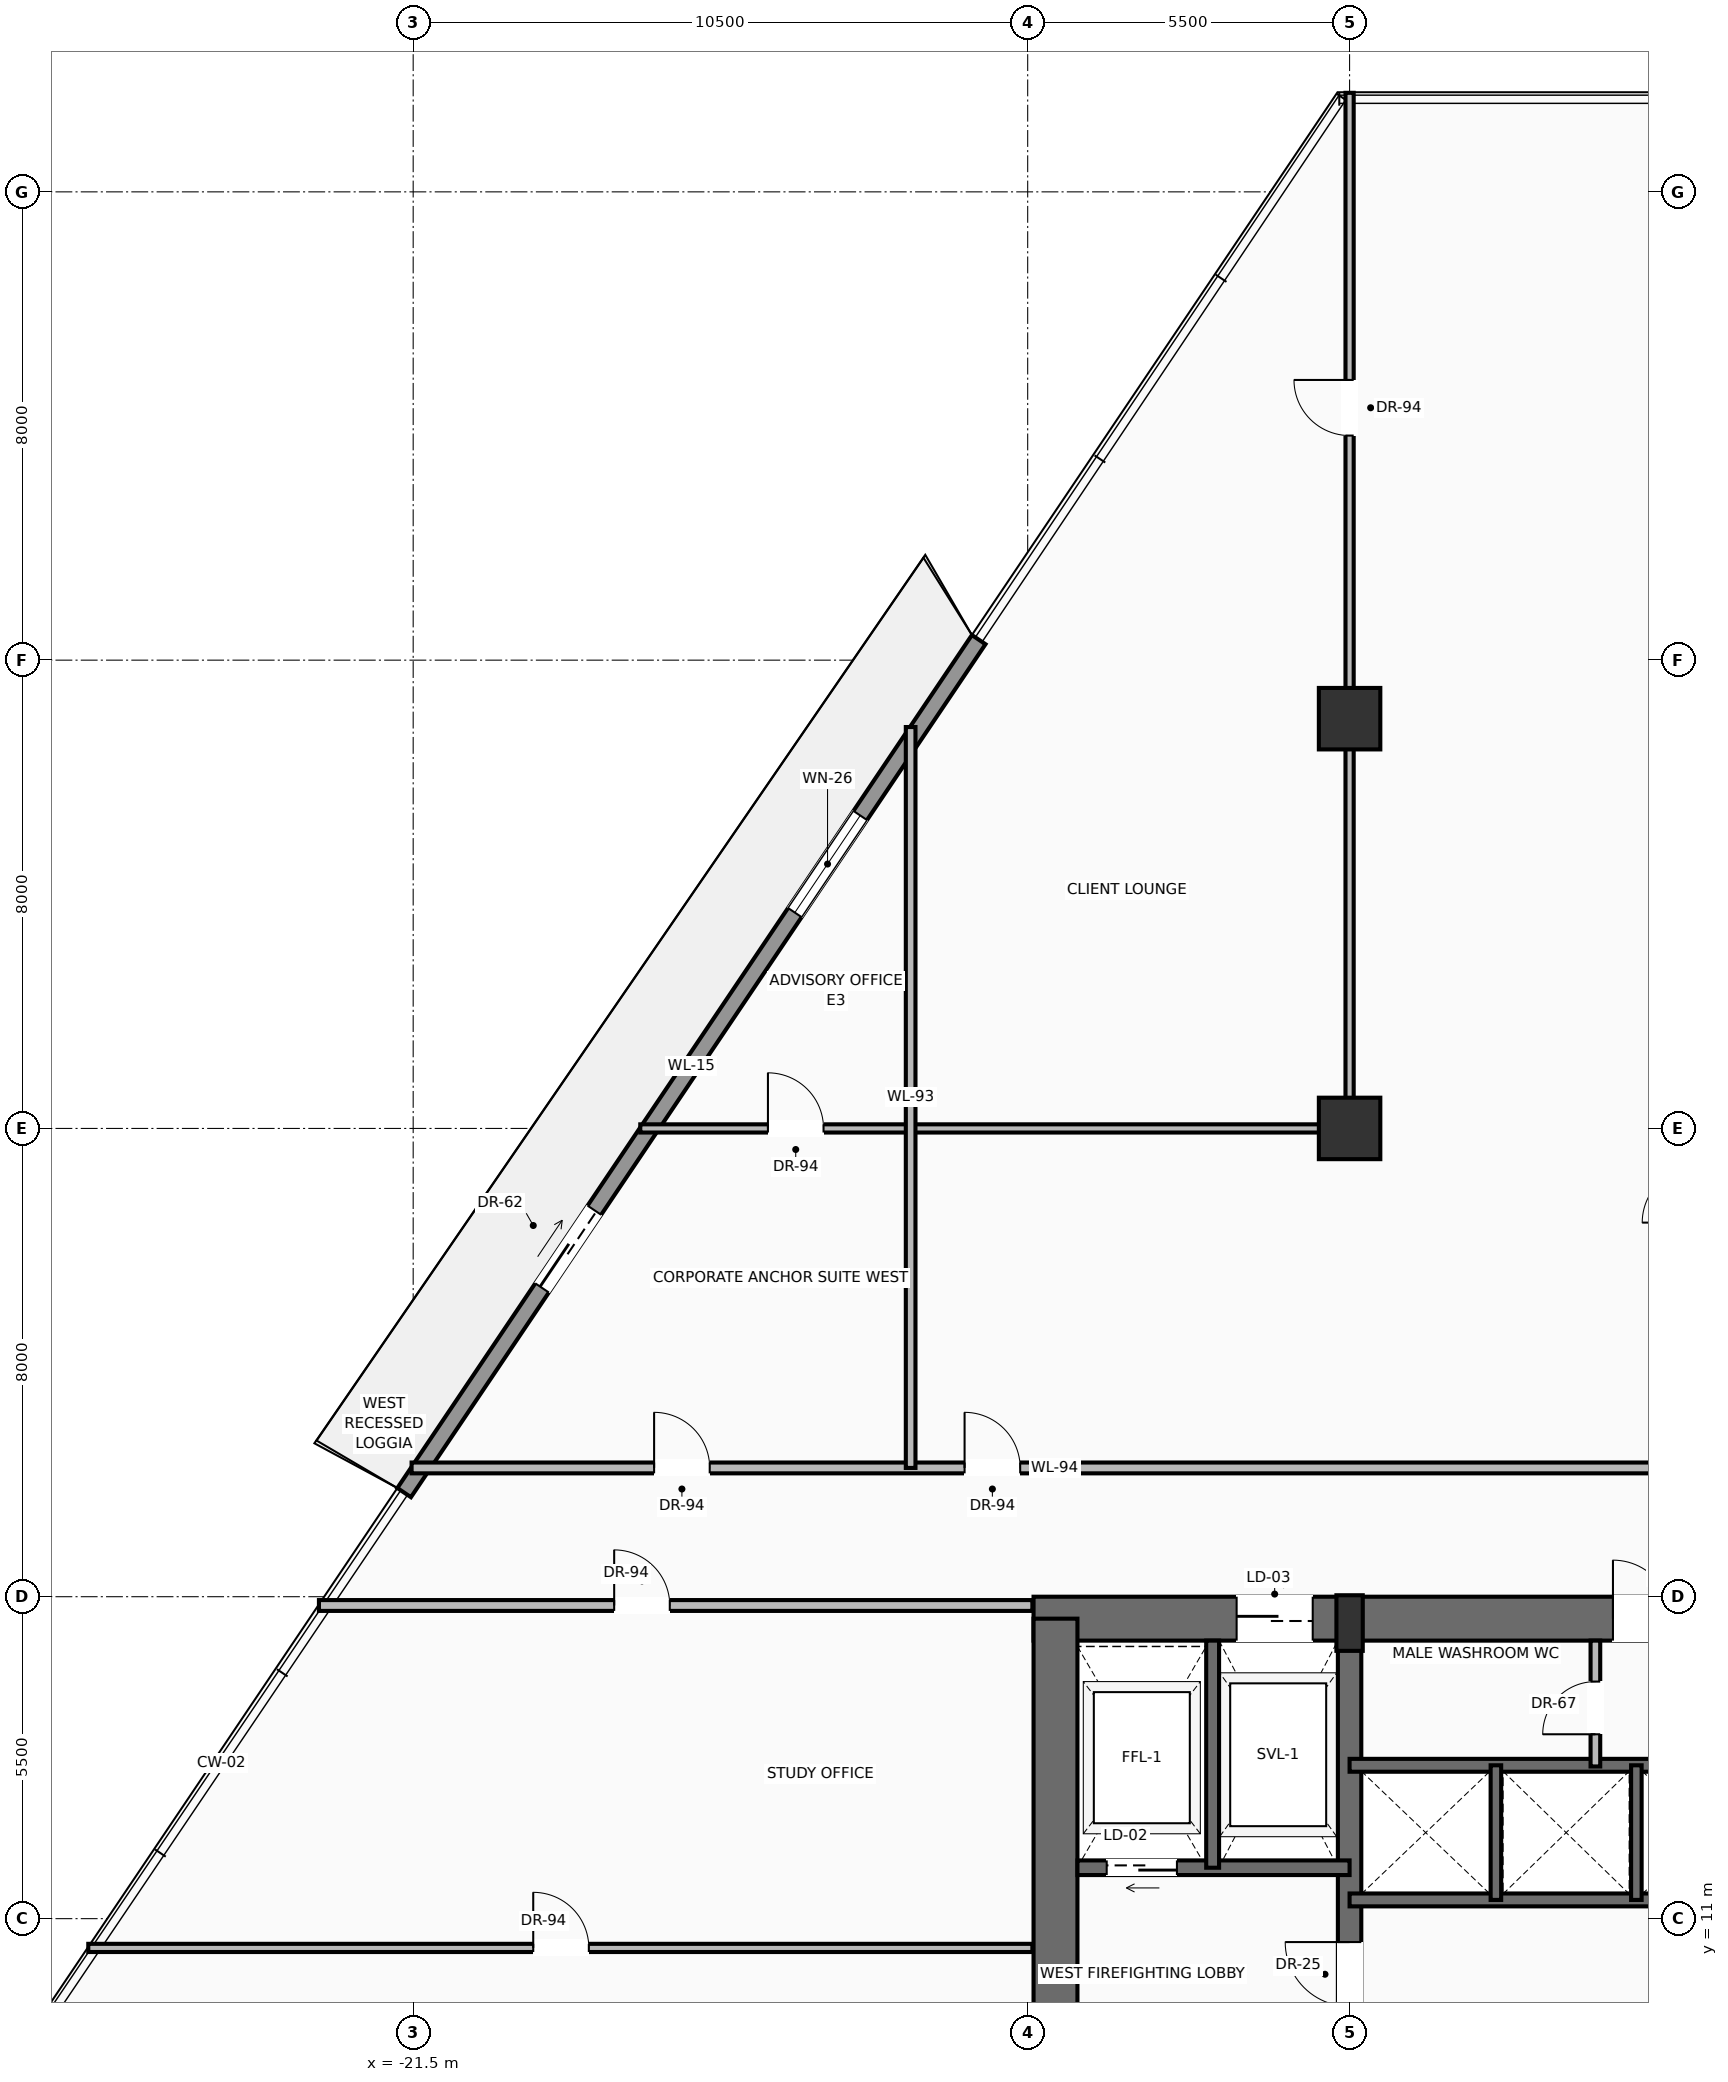
"""IFC4 building model, lengths in metres.
Left out: names, types, materials, properties, quantities, classifications, styles, units other than length and angle.
Written with IfcOpenShell. Run it as: python <this file> out.ifc"""

import sys

from ifc_helpers import new_model, si_unit, direction, frame, frame_2d, origin, origin_2d, place, context, subcontext, project, spatial, rectangle, extrude, source, transform, mapped, element, fill, save


model = new_model("IFC4")
c1 = context("Model", 3, precision=1e-05, world=origin(), true_north=direction((0.0, 1.0)))
c2 = subcontext(c1, "Body", "Model", "MODEL_VIEW")
j1 = project(units=[si_unit("LENGTHUNIT", "METRE"), si_unit("PLANEANGLEUNIT", "RADIAN")], contexts=[c1])
p1 = place(None, origin())
s1 = spatial("IfcSite", under=j1, at=p1, CompositionType="ELEMENT")
p2 = place(p1, origin())
s2 = spatial("IfcBuilding", under=s1, at=p2, CompositionType="ELEMENT")
p3 = place(p2, frame((0.0, 0.0, 91.4)))
s3 = spatial("IfcBuildingStorey", under=s2, at=p3, CompositionType="ELEMENT", Elevation=91.4)
p4 = place(p3, frame((-10.9, 16.125, 0.0), z_axis=(0.0, 0.0, 1.0), x_axis=(1.0, 0.0, 0.0)))
e1 = element("IfcWall", 1, at=p4, inside=s3, PredefinedType="SHEAR", context=c2, shape_type="SweptSolid", body=[
    extrude(rectangle(XDim=21.8, YDim=0.75, at=frame_2d((10.9, 0.0))), origin(), (0.0, 0.0, 1.0), 3.45),
])
p5 = place(p4, frame((3.47, 0.0, 0.0)))
e2 = element("IfcOpeningElement", 2, at=p5, cuts=e1, PredefinedType="OPENING", context=c2, shape_type="SweptSolid", body=[
    extrude(rectangle(XDim=1.3, YDim=2.3, at=frame_2d((0.65, 1.15))), frame((0.0, 0.385, 0.0), z_axis=(0.0, -1.0, 0.0), x_axis=(1.0, 0.0, 0.0)), (0.0, 0.0, 1.0), 0.77),
])
p6 = place(p4, frame((9.9, 0.0, 0.0)))
e3 = element("IfcOpeningElement", 3, at=p6, cuts=e1, PredefinedType="OPENING", context=c2, shape_type="SweptSolid", body=[
    extrude(rectangle(XDim=2.0, YDim=2.4, at=frame_2d((1.0, 1.2))), frame((0.0, 0.385, 0.0), z_axis=(0.0, -1.0, 0.0), x_axis=(1.0, 0.0, 0.0)), (0.0, 0.0, 1.0), 0.77),
])
p7 = place(p3, frame((-10.525, 0.475, 0.0), z_axis=(0.0, 0.0, 1.0), x_axis=(0.0, 1.0, 0.0)))
e4 = element("IfcWall", 4, at=p7, inside=s3, PredefinedType="SHEAR", context=c2, shape_type="SweptSolid", body=[
    extrude(rectangle(XDim=15.65, YDim=0.75, at=frame_2d((7.825, 0.0))), origin(), (0.0, 0.0, 1.0), 3.45),
])
p8 = place(p3, frame((-5.5, 0.475, 0.0), z_axis=(0.0, 0.0, 1.0), x_axis=(0.0, 1.0, 0.0)))
e5 = element("IfcWall", 5, at=p8, inside=s3, PredefinedType="SHEAR", context=c2, shape_type="SweptSolid", body=[
    extrude(rectangle(XDim=15.65, YDim=0.4, at=frame_2d((7.825, 0.0))), origin(), (0.0, 0.0, 1.0), 3.45),
])
p9 = place(p8, frame((9.025, 0.0, 0.0)))
e6 = element("IfcOpeningElement", 6, at=p9, cuts=e5, PredefinedType="OPENING", context=c2, shape_type="SweptSolid", body=[
    extrude(rectangle(XDim=1.1, YDim=2.2, at=frame_2d((0.55, 1.1))), frame((0.0, 0.21, 0.0), z_axis=(0.0, -1.0, 0.0), x_axis=(1.0, 0.0, 0.0)), (0.0, 0.0, 1.0), 0.42),
])
m1 = source(origin(), c2, "Body", "SweptSolid", [
    extrude(rectangle(XDim=0.45, YDim=0.95, at=origin_2d()), origin(), (0.0, 0.0, 1.0), 3.7),
])
p10 = place(p3, frame((-5.5, 16.05, 0.0), z_axis=(0.0, 0.0, 1.0), x_axis=(1.0, 0.0, 0.0)))
e7 = element("IfcColumn", 7, at=p10, inside=s3, PredefinedType="PILASTER", context=c2, shape_type="MappedRepresentation", body=[
    mapped(m1, transform((0.0, 0.0, 0.0), scale=1.0)),
])
m2 = source(origin(), c2, "Body", "SweptSolid", [
    extrude(rectangle(XDim=1.05, YDim=1.05, at=origin_2d()), origin(), (0.0, 0.0, 1.0), 3.7),
])
for number, where, z_axis, x_axis in (
    (8, (-5.5, 24.5, 0.0), (0.0, 0.0, 1.0), (1.0, 0.0, 0.0)),
    (9, (-5.5, 31.5, 0.0), (0.0, 0.0, 1.0), (1.0, 0.0, 0.0)),
):
    element("IfcColumn", number, at=place(p3, frame(where, z_axis=z_axis, x_axis=x_axis)), inside=s3, PredefinedType="COLUMN", context=c2, shape_type="MappedRepresentation", body=[
        mapped(m2, transform((0.0, 0.0, 0.0), scale=1.0)),
    ])
p11 = place(p3, frame((-21.654, 18.279, 0.0), z_axis=(0.0, 0.0, 1.0), x_axis=(0.558730690693, 0.829349151611, 0.0)))
e10 = element("IfcWall", 10, at=p11, inside=s3, PredefinedType="SOLIDWALL", context=c2, shape_type="SweptSolid", body=[
    extrude(rectangle(XDim=17.57, YDim=0.28, at=frame_2d((8.785, 0.0))), origin(), (0.0, 0.0, 1.0), 3.03),
])
p12 = place(p11, frame((4.217, 0.0, 0.0)))
e11 = element("IfcOpeningElement", 11, at=p12, cuts=e10, PredefinedType="OPENING", context=c2, shape_type="SweptSolid", body=[
    extrude(rectangle(XDim=1.6, YDim=2.35, at=frame_2d((0.8, 1.175))), frame((0.0, 0.15, 0.0), z_axis=(0.0, -1.0, 0.0), x_axis=(1.0, 0.0, 0.0)), (0.0, 0.0, 1.0), 0.3),
])
p13 = place(p11, frame((11.948, 0.0, 0.9)))
e12 = element("IfcOpeningElement", 12, at=p13, cuts=e10, PredefinedType="OPENING", context=c2, shape_type="SweptSolid", body=[
    extrude(rectangle(XDim=2.0, YDim=1.85, at=frame_2d((1.0, 0.925))), frame((0.0, 0.15, 0.0), z_axis=(0.0, -1.0, 0.0), x_axis=(1.0, 0.0, 0.0)), (0.0, 0.0, 1.0), 0.3),
])
p14 = place(p3, frame((-5.5, 11.87, 0.0), z_axis=(0.0, 0.0, 1.0), x_axis=(-1.0, 0.0, 0.0)))
e13 = element("IfcWall", 13, at=p14, inside=s3, PredefinedType="SOLIDWALL", context=c2, shape_type="SweptSolid", body=[
    extrude(rectangle(XDim=4.65, YDim=0.25, at=frame_2d((2.325, 0.0))), origin(), (0.0, 0.0, 1.0), 3.45),
])
p15 = place(p14, frame((2.95, 0.0, 0.0)))
e14 = element("IfcOpeningElement", 14, at=p15, cuts=e13, PredefinedType="OPENING", context=c2, shape_type="SweptSolid", body=[
    extrude(rectangle(XDim=1.2, YDim=2.25, at=frame_2d((0.6, 1.125))), frame((0.0, 0.135, 0.0), z_axis=(0.0, -1.0, 0.0), x_axis=(1.0, 0.0, 0.0)), (0.0, 0.0, 1.0), 0.27),
])
p16 = place(p3, frame((-7.84, 11.87, 0.0), z_axis=(0.0, 0.0, 1.0), x_axis=(0.0, 1.0, 0.0)))
e15 = element("IfcWall", 15, at=p16, inside=s3, PredefinedType="SOLIDWALL", context=c2, shape_type="SweptSolid", body=[
    extrude(rectangle(XDim=3.88, YDim=0.22, at=frame_2d((1.94, 0.0))), origin(), (0.0, 0.0, 1.0), 3.45),
])
for number, where, z_axis, x_axis in (
    (16, (-5.5, 11.32, 0.0), (0.0, 0.0, 1.0), (1.0, 0.0, 0.0)),
    (17, (-5.5, 13.62, 0.0), (0.0, 0.0, 1.0), (1.0, 0.0, 0.0)),
):
    element("IfcWall", number, at=place(p3, frame(where, z_axis=z_axis, x_axis=x_axis)), inside=s3, PredefinedType="SOLIDWALL", context=c2, shape_type="SweptSolid", body=[
        extrude(rectangle(XDim=7.32, YDim=0.22, at=frame_2d((3.66, 0.0))), origin(), (0.0, 0.0, 1.0), 3.45),
    ])
for number, where, z_axis, x_axis in (
    (18, (-3.0, 11.32, 0.0), (0.0, 0.0, 1.0), (0.0, 1.0, 0.0)),
    (19, (-0.6, 11.32, 0.0), (0.0, 0.0, 1.0), (0.0, 1.0, 0.0)),
):
    element("IfcWall", number, at=place(p3, frame(where, z_axis=z_axis, x_axis=x_axis)), inside=s3, PredefinedType="SOLIDWALL", context=c2, shape_type="SweptSolid", body=[
        extrude(rectangle(XDim=2.3, YDim=0.18, at=frame_2d((1.15, 0.0))), origin(), (0.0, 0.0, 1.0), 3.45),
    ])
p17 = place(p3, frame((-1.3, 13.6, 0.0), z_axis=(0.0, 0.0, 1.0), x_axis=(0.0, 1.0, 0.0)))
e20 = element("IfcWall", 20, at=p17, inside=s3, PredefinedType="PARTITIONING", context=c2, shape_type="SweptSolid", body=[
    extrude(rectangle(XDim=2.15, YDim=0.165, at=frame_2d((1.075, 0.0))), origin(), (0.0, 0.0, 1.0), 3.442),
])
p18 = place(p17, frame((0.55, 0.0, 0.0)))
e21 = element("IfcOpeningElement", 21, at=p18, cuts=e20, PredefinedType="OPENING", context=c2, shape_type="SweptSolid", body=[
    extrude(rectangle(XDim=0.9, YDim=2.1, at=frame_2d((0.45, 1.05))), frame((0.0, 0.093, 0.0), z_axis=(0.0, -1.0, 0.0), x_axis=(1.0, 0.0, 0.0)), (0.0, 0.0, 1.0), 0.185),
])
p19 = place(p3, frame((-23.11, 16.35, 0.0), z_axis=(0.0, 0.0, 1.0), x_axis=(1.0, 0.0, 0.0)))
e22 = element("IfcWall", 22, at=p19, inside=s3, PredefinedType="PARTITIONING", context=c2, shape_type="SweptSolid", body=[
    extrude(rectangle(XDim=12.19, YDim=0.185, at=frame_2d((6.095, 0.0))), origin(), (0.0, 0.0, 1.0), 2.747),
])
p20 = place(p19, frame((5.045, 0.0, 0.0)))
e23 = element("IfcOpeningElement", 23, at=p20, cuts=e22, PredefinedType="OPENING", context=c2, shape_type="SweptSolid", body=[
    extrude(rectangle(XDim=0.95, YDim=2.2, at=frame_2d((0.475, 1.1))), frame((0.0, 0.103, 0.0), z_axis=(0.0, -1.0, 0.0), x_axis=(1.0, 0.0, 0.0)), (0.0, 0.0, 1.0), 0.205),
])
p21 = place(p3, frame((-21.527, 18.7, 0.0), z_axis=(0.0, 0.0, 1.0), x_axis=(1.0, 0.0, 0.0)))
e24 = element("IfcWall", 24, at=p21, inside=s3, PredefinedType="PARTITIONING", context=c2, shape_type="SweptSolid", body=[
    extrude(rectangle(XDim=21.977, YDim=0.185, at=frame_2d((10.989, 0.0))), origin(), (0.0, 0.0, 1.0), 2.747),
])
p22 = place(p21, frame((9.449, 0.0, 0.0)))
e25 = element("IfcOpeningElement", 25, at=p22, cuts=e24, PredefinedType="OPENING", context=c2, shape_type="SweptSolid", body=[
    extrude(rectangle(XDim=0.95, YDim=2.2, at=frame_2d((0.475, 1.1))), frame((0.0, 0.103, 0.0), z_axis=(0.0, -1.0, 0.0), x_axis=(1.0, 0.0, 0.0)), (0.0, 0.0, 1.0), 0.205),
])
p23 = place(p21, frame((4.144, 0.0, 0.0)))
e26 = element("IfcOpeningElement", 26, at=p23, cuts=e24, PredefinedType="OPENING", context=c2, shape_type="SweptSolid", body=[
    extrude(rectangle(XDim=0.95, YDim=2.2, at=frame_2d((0.475, 1.1))), frame((0.0, 0.103, 0.0), z_axis=(0.0, -1.0, 0.0), x_axis=(1.0, 0.0, 0.0)), (0.0, 0.0, 1.0), 0.205),
])
p24 = place(p3, frame((-5.5, 24.5, 0.0), z_axis=(0.0, 0.0, 1.0), x_axis=(0.0, 1.0, 0.0)))
e27 = element("IfcWall", 27, at=p24, inside=s3, PredefinedType="PARTITIONING", context=c2, shape_type="SweptSolid", body=[
    extrude(rectangle(XDim=17.692, YDim=0.14, at=frame_2d((8.846, 0.0))), origin(), (0.0, 0.0, 1.0), 2.747),
])
p25 = place(p24, frame((11.837, 0.0, 0.0)))
e28 = element("IfcOpeningElement", 28, at=p25, cuts=e27, PredefinedType="OPENING", context=c2, shape_type="SweptSolid", body=[
    extrude(rectangle(XDim=0.95, YDim=2.2, at=frame_2d((0.475, 1.1))), frame((0.0, 0.08, 0.0), z_axis=(0.0, -1.0, 0.0), x_axis=(1.0, 0.0, 0.0)), (0.0, 0.0, 1.0), 0.16),
])
p26 = place(p3, frame((-17.62, 24.5, 0.0), z_axis=(0.0, 0.0, 1.0), x_axis=(1.0, 0.0, 0.0)))
e29 = element("IfcWall", 29, at=p26, inside=s3, PredefinedType="PARTITIONING", context=c2, shape_type="SweptSolid", body=[
    extrude(rectangle(XDim=12.12, YDim=0.14, at=frame_2d((6.06, 0.0))), origin(), (0.0, 0.0, 1.0), 2.747),
])
p27 = place(p26, frame((2.181, 0.0, 0.0)))
e30 = element("IfcOpeningElement", 30, at=p27, cuts=e29, PredefinedType="OPENING", context=c2, shape_type="SweptSolid", body=[
    extrude(rectangle(XDim=0.95, YDim=2.2, at=frame_2d((0.475, 1.1))), frame((0.0, 0.08, 0.0), z_axis=(0.0, -1.0, 0.0), x_axis=(1.0, 0.0, 0.0)), (0.0, 0.0, 1.0), 0.16),
])
p28 = place(p3, frame((-13.0, 18.7, 0.0), z_axis=(0.0, 0.0, 1.0), x_axis=(0.0, 1.0, 0.0)))
e31 = element("IfcWall", 31, at=p28, inside=s3, PredefinedType="PARTITIONING", context=c2, shape_type="SweptSolid", body=[
    extrude(rectangle(XDim=12.657, YDim=0.165, at=frame_2d((6.329, 0.0))), origin(), (0.0, 0.0, 1.0), 2.747),
])
p29 = place(p3, frame((-27.051, 10.5, 0.0), z_axis=(0.0, 0.0, 1.0), x_axis=(1.0, 0.0, 0.0)))
e32 = element("IfcWall", 32, at=p29, inside=s3, PredefinedType="PARTITIONING", context=c2, shape_type="SweptSolid", body=[
    extrude(rectangle(XDim=16.131, YDim=0.14, at=frame_2d((8.066, 0.0))), origin(), (0.0, 0.0, 1.0), 3.442),
])
p30 = place(p29, frame((7.603, 0.0, 0.0)))
e33 = element("IfcOpeningElement", 33, at=p30, cuts=e32, PredefinedType="OPENING", context=c2, shape_type="SweptSolid", body=[
    extrude(rectangle(XDim=0.95, YDim=2.2, at=frame_2d((0.475, 1.1))), frame((0.0, 0.08, 0.0), z_axis=(0.0, -1.0, 0.0), x_axis=(1.0, 0.0, 0.0)), (0.0, 0.0, 1.0), 0.16),
])
m3 = source(origin(), c2, "Body", "SweptSolid", [
    extrude(rectangle(XDim=1.6, YDim=2.35, at=frame_2d((0.8, 1.175))), frame((0.0, 0.025, 0.0), z_axis=(0.0, -1.0, 0.0), x_axis=(1.0, 0.0, 0.0)), (0.0, 0.0, 1.0), 0.05),
])
p31 = place(p12, origin())
e34 = element("IfcDoor", 34, at=p31, inside=s3, OperationType="SLIDING_TO_LEFT", PredefinedType="DOOR", context=c2, shape_type="MappedRepresentation", body=[
    mapped(m3, transform((0.0, 0.0, 0.0), scale=1.0)),
])
fill(e11, e34)
m4 = source(origin(), c2, "Body", "SweptSolid", [
    extrude(rectangle(XDim=2.0, YDim=1.85, at=frame_2d((1.0, 0.925))), frame((0.0, 0.03, 0.0), z_axis=(0.0, -1.0, 0.0), x_axis=(1.0, 0.0, 0.0)), (0.0, 0.0, 1.0), 0.06),
])
p32 = place(p13, origin())
e35 = element("IfcWindow", 35, at=p32, inside=s3, PartitioningType="SINGLE_PANEL", PredefinedType="WINDOW", context=c2, shape_type="MappedRepresentation", body=[
    mapped(m4, transform((0.0, 0.0, 0.0), scale=1.0)),
])
fill(e12, e35)
m5 = source(origin(), c2, "Body", "SweptSolid", [
    extrude(rectangle(XDim=1.1, YDim=2.2, at=frame_2d((0.55, 1.1))), frame((0.0, 0.025, 0.0), z_axis=(0.0, -1.0, 0.0), x_axis=(1.0, 0.0, 0.0)), (0.0, 0.0, 1.0), 0.05),
])
p33 = place(p9, origin())
e36 = element("IfcDoor", 36, at=p33, inside=s3, OperationType="SINGLE_SWING_RIGHT", PredefinedType="DOOR", context=c2, shape_type="MappedRepresentation", body=[
    mapped(m5, transform((0.0, 0.0, 0.0), scale=1.0)),
])
fill(e6, e36)
m6 = source(origin(), c2, "Body", "SweptSolid", [
    extrude(rectangle(XDim=1.2, YDim=2.25, at=frame_2d((0.6, 1.125))), frame((0.0, 0.025, 0.0), z_axis=(0.0, -1.0, 0.0), x_axis=(1.0, 0.0, 0.0)), (0.0, 0.0, 1.0), 0.05),
])
p34 = place(p15, origin())
e37 = element("IfcDoor", 37, at=p34, inside=s3, OperationType="SLIDING_TO_LEFT", PredefinedType="DOOR", context=c2, shape_type="MappedRepresentation", body=[
    mapped(m6, transform((0.0, 0.0, 0.0), scale=1.0)),
])
fill(e14, e37)
m7 = source(origin(), c2, "Body", "SweptSolid", [
    extrude(rectangle(XDim=1.3, YDim=2.3, at=frame_2d((0.65, 1.15))), frame((0.0, 0.025, 0.0), z_axis=(0.0, -1.0, 0.0), x_axis=(1.0, 0.0, 0.0)), (0.0, 0.0, 1.0), 0.05),
])
p35 = place(p5, origin())
e38 = element("IfcDoor", 38, at=p35, inside=s3, OperationType="SLIDING_TO_RIGHT", PredefinedType="DOOR", context=c2, shape_type="MappedRepresentation", body=[
    mapped(m7, transform((0.0, 0.0, 0.0), scale=1.0)),
])
fill(e2, e38)
m8 = source(origin(), c2, "Body", "SweptSolid", [
    extrude(rectangle(XDim=2.0, YDim=2.4, at=frame_2d((1.0, 1.2))), frame((0.0, 0.025, 0.0), z_axis=(0.0, -1.0, 0.0), x_axis=(1.0, 0.0, 0.0)), (0.0, 0.0, 1.0), 0.05),
])
p36 = place(p6, origin())
e39 = element("IfcDoor", 39, at=p36, inside=s3, OperationType="DOUBLE_DOOR_SINGLE_SWING", PredefinedType="DOOR", context=c2, shape_type="MappedRepresentation", body=[
    mapped(m8, transform((0.0, 0.0, 0.0), scale=1.0)),
])
fill(e3, e39)
m9 = source(origin(), c2, "Body", "SweptSolid", [
    extrude(rectangle(XDim=0.9, YDim=2.1, at=frame_2d((0.45, 1.05))), frame((0.0, 0.025, 0.0), z_axis=(0.0, -1.0, 0.0), x_axis=(1.0, 0.0, 0.0)), (0.0, 0.0, 1.0), 0.05),
])
p37 = place(p18, origin())
e40 = element("IfcDoor", 40, at=p37, inside=s3, OperationType="SINGLE_SWING_LEFT", PredefinedType="DOOR", context=c2, shape_type="MappedRepresentation", body=[
    mapped(m9, transform((0.0, 0.0, 0.0), scale=1.0)),
])
fill(e21, e40)
m10 = source(origin(), c2, "Body", "SweptSolid", [
    extrude(rectangle(XDim=0.95, YDim=2.2, at=frame_2d((0.475, 1.1))), frame((0.0, 0.025, 0.0), z_axis=(0.0, -1.0, 0.0), x_axis=(1.0, 0.0, 0.0)), (0.0, 0.0, 1.0), 0.05),
])
p38 = place(p20, origin())
e41 = element("IfcDoor", 41, at=p38, inside=s3, OperationType="SINGLE_SWING_LEFT", PredefinedType="DOOR", context=c2, shape_type="MappedRepresentation", body=[
    mapped(m10, transform((0.0, 0.0, 0.0), scale=1.0)),
])
fill(e23, e41)
p39 = place(p22, origin())
e42 = element("IfcDoor", 42, at=p39, inside=s3, OperationType="SINGLE_SWING_LEFT", PredefinedType="DOOR", context=c2, shape_type="MappedRepresentation", body=[
    mapped(m10, transform((0.0, 0.0, 0.0), scale=1.0)),
])
fill(e25, e42)
p40 = place(p30, origin())
e43 = element("IfcDoor", 43, at=p40, inside=s3, OperationType="SINGLE_SWING_LEFT", PredefinedType="DOOR", context=c2, shape_type="MappedRepresentation", body=[
    mapped(m10, transform((0.0, 0.0, 0.0), scale=1.0)),
])
fill(e33, e43)
p41 = place(p23, origin())
e44 = element("IfcDoor", 44, at=p41, inside=s3, OperationType="SINGLE_SWING_LEFT", PredefinedType="DOOR", context=c2, shape_type="MappedRepresentation", body=[
    mapped(m10, transform((0.0, 0.0, 0.0), scale=1.0)),
])
fill(e26, e44)
p42 = place(p25, origin())
e45 = element("IfcDoor", 45, at=p42, inside=s3, OperationType="SINGLE_SWING_RIGHT", PredefinedType="DOOR", context=c2, shape_type="MappedRepresentation", body=[
    mapped(m10, transform((0.0, 0.0, 0.0), scale=1.0)),
])
fill(e28, e45)
p43 = place(p27, origin())
e46 = element("IfcDoor", 46, at=p43, inside=s3, OperationType="SINGLE_SWING_LEFT", PredefinedType="DOOR", context=c2, shape_type="MappedRepresentation", body=[
    mapped(m10, transform((0.0, 0.0, 0.0), scale=1.0)),
])
fill(e30, e46)
save(model, sys.argv[1])
